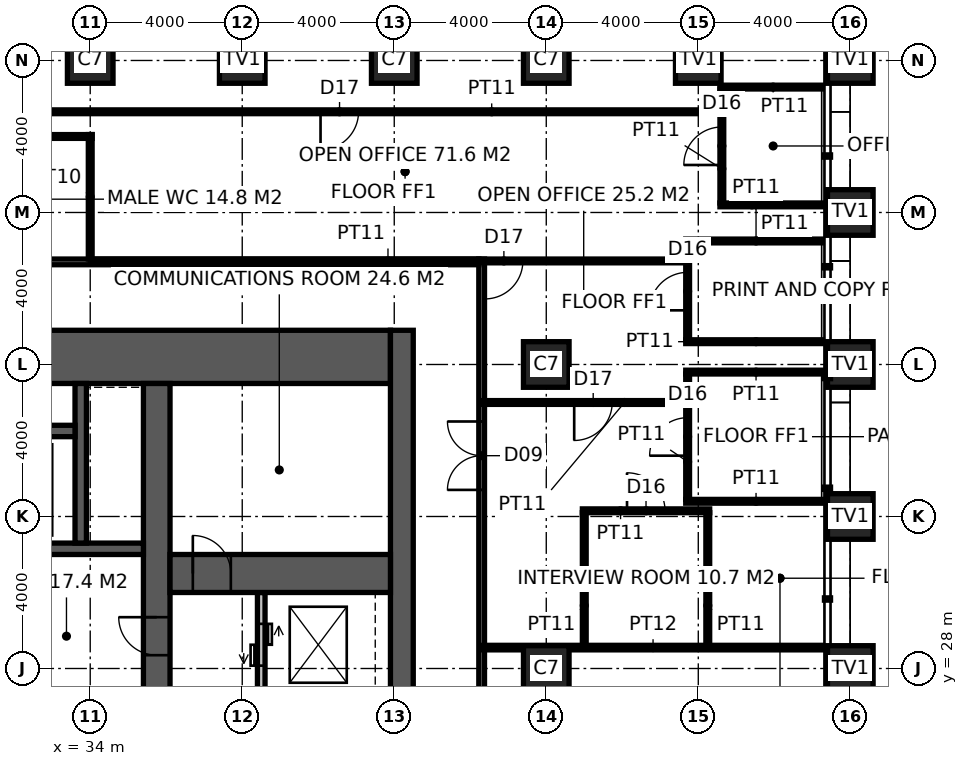
"""IFC4 building model, lengths in metres.
Left out: names, types, materials, properties, quantities, classifications, styles, units other than length and angle.
Written with IfcOpenShell. Run it as: python <this file> out.ifc"""

import sys

from ifc_helpers import new_model, si_unit, direction, frame, frame_2d, origin, origin_2d, place, context, subcontext, project, spatial, rectangle, hollow_rectangle, extrude, element, fill, save


model = new_model("IFC4")
c1 = context("Model", 3, precision=1e-05, world=origin(), true_north=direction((0.0, 1.0)))
c2 = subcontext(c1, "Body", "Model", "MODEL_VIEW")
j1 = project(units=[si_unit("LENGTHUNIT", "METRE"), si_unit("PLANEANGLEUNIT", "RADIAN")], contexts=[c1])
p1 = place(None, origin())
s1 = spatial("IfcSite", under=j1, at=p1, CompositionType="ELEMENT")
p2 = place(p1, origin())
s2 = spatial("IfcBuilding", under=s1, at=p2, CompositionType="ELEMENT")
p3 = place(p2, frame((0.0, 0.0, 43.0)))
s3 = spatial("IfcBuildingStorey", under=s2, at=p3, CompositionType="ELEMENT", Elevation=43.0)
for number, where, z_axis, x_axis in (
    (1, (54.0, 28.0, 0.0), (0.0, 0.0, 1.0), (1.0, 0.0, 0.0)),
    (2, (54.0, 32.0, 0.0), (0.0, 0.0, 1.0), (1.0, 0.0, 0.0)),
    (3, (54.0, 36.0, 0.0), (0.0, 0.0, 1.0), (1.0, 0.0, 0.0)),
    (4, (54.0, 40.0, 0.0), (0.0, 0.0, 1.0), (1.0, 0.0, 0.0)),
    (5, (54.0, 44.0, 0.0), (0.0, 0.0, 1.0), (1.0, 0.0, 0.0)),
    (6, (38.0, 44.0, 0.0), (0.0, 0.0, 1.0), (1.0, 0.0, 0.0)),
    (7, (50.0, 44.0, 0.0), (0.0, 0.0, 1.0), (1.0, 0.0, 0.0)),
):
    element("IfcColumn", number, at=place(p3, frame(where, z_axis=z_axis, x_axis=x_axis)), inside=s3, PredefinedType="USERDEFINED", context=c2, shape_type="SweptSolid", body=[
        extrude(hollow_rectangle(XDim=1.2, YDim=1.2, WallThickness=0.1, at=origin_2d()), origin(), (0.0, 0.0, 1.0), 4.0),
    ])
for number, where, z_axis, x_axis in (
    (8, (34.0, 44.0, 0.0), (0.0, 0.0, 1.0), (1.0, 0.0, 0.0)),
    (9, (42.0, 44.0, 0.0), (0.0, 0.0, 1.0), (1.0, 0.0, 0.0)),
    (10, (46.0, 28.0, 0.0), (0.0, 0.0, 1.0), (1.0, 0.0, 0.0)),
    (11, (46.0, 36.0, 0.0), (0.0, 0.0, 1.0), (1.0, 0.0, 0.0)),
    (12, (46.0, 44.0, 0.0), (0.0, 0.0, 1.0), (1.0, 0.0, 0.0)),
):
    element("IfcColumn", number, at=place(p3, frame(where, z_axis=z_axis, x_axis=x_axis)), inside=s3, PredefinedType="COLUMN", context=c2, shape_type="SweptSolid", body=[
        extrude(hollow_rectangle(XDim=1.2, YDim=1.2, WallThickness=0.1, at=origin_2d()), origin(), (0.0, 0.0, 1.0), 4.0),
    ])
p4 = place(p3, frame((18.5, 36.2, -0.15), z_axis=(0.0, 0.0, 1.0), x_axis=(1.0, 0.0, 0.0)))
e13 = element("IfcWall", 13, at=p4, inside=s3, PredefinedType="SHEAR", context=c2, shape_type="SweptSolid", body=[
    extrude(rectangle(XDim=23.4, YDim=1.4, at=frame_2d((11.7, 0.0))), origin(), (0.0, 0.0, 1.0), 4.0),
])
p5 = place(p3, frame((42.2, 17.1, -0.15), z_axis=(0.0, 0.0, 1.0), x_axis=(0.0, 1.0, 0.0)))
e14 = element("IfcWall", 14, at=p5, inside=s3, PredefinedType="SHEAR", context=c2, shape_type="SweptSolid", body=[
    extrude(rectangle(XDim=19.8, YDim=0.6, at=frame_2d((9.9, 0.0))), origin(), (0.0, 0.0, 1.0), 4.0),
])
p6 = place(p3, frame((35.75, 18.5, -0.15), z_axis=(0.0, 0.0, 1.0), x_axis=(0.0, 1.0, 0.0)))
e15 = element("IfcWall", 15, at=p6, inside=s3, PredefinedType="SHEAR", context=c2, shape_type="SweptSolid", body=[
    extrude(rectangle(XDim=17.0, YDim=0.7, at=frame_2d((8.5, 0.0))), origin(), (0.0, 0.0, 1.0), 4.0),
])
p7 = place(p6, frame((9.85, 0.0, 0.15)))
e16 = element("IfcOpeningElement", 16, at=p7, cuts=e15, PredefinedType="OPENING", context=c2, shape_type="SweptSolid", body=[
    extrude(rectangle(XDim=1.0, YDim=2.2, at=frame_2d((0.5, 1.1))), frame((0.0, 0.36, 0.0), z_axis=(0.0, -1.0, 0.0), x_axis=(1.0, 0.0, 0.0)), (0.0, 0.0, 1.0), 0.72),
])
p8 = place(p3, frame((24.15, 31.15, -0.15), z_axis=(0.0, 0.0, 1.0), x_axis=(1.0, 0.0, 0.0)))
e17 = element("IfcWall", 17, at=p8, inside=s3, PredefinedType="SHEAR", context=c2, shape_type="SweptSolid", body=[
    extrude(rectangle(XDim=11.25, YDim=0.3, at=frame_2d((5.625, 0.0))), origin(), (0.0, 0.0, 1.0), 4.0),
])
p9 = place(p8, frame((7.25, 0.0, 0.15)))
e18 = element("IfcOpeningElement", 18, at=p9, cuts=e17, PredefinedType="OPENING", context=c2, shape_type="SweptSolid", body=[
    extrude(rectangle(XDim=1.4, YDim=2.4, at=frame_2d((0.7, 1.2))), frame((0.0, 0.16, 0.0), z_axis=(0.0, -1.0, 0.0), x_axis=(1.0, 0.0, 0.0)), (0.0, 0.0, 1.0), 0.32),
])
p10 = place(p3, frame((33.75, 31.3, -0.15), z_axis=(0.0, 0.0, 1.0), x_axis=(0.0, 1.0, 0.0)))
e19 = element("IfcWall", 19, at=p10, inside=s3, PredefinedType="SHEAR", context=c2, shape_type="SweptSolid", body=[
    extrude(rectangle(XDim=4.2, YDim=0.3, at=frame_2d((2.1, 0.0))), origin(), (0.0, 0.0, 1.0), 4.0),
])
p11 = place(p3, frame((25.0, 34.25, -0.15), z_axis=(0.0, 0.0, 1.0), x_axis=(1.0, 0.0, 0.0)))
e20 = element("IfcWall", 20, at=p11, inside=s3, PredefinedType="SHEAR", context=c2, shape_type="SweptSolid", body=[
    extrude(rectangle(XDim=8.6, YDim=0.3, at=frame_2d((4.3, 0.0))), origin(), (0.0, 0.0, 1.0), 4.0),
])
p12 = place(p3, frame((38.5, 18.5, -0.15), z_axis=(0.0, 0.0, 1.0), x_axis=(0.0, 1.0, 0.0)))
e21 = element("IfcWall", 21, at=p12, inside=s3, PredefinedType="SOLIDWALL", context=c2, shape_type="SweptSolid", body=[
    extrude(rectangle(XDim=11.5, YDim=0.2, at=frame_2d((5.75, 0.0))), origin(), (0.0, 0.0, 1.0), 4.0),
])
p13 = place(p12, frame((0.875, 0.0, 0.15)))
e22 = element("IfcOpeningElement", 22, at=p13, cuts=e21, PredefinedType="OPENING", context=c2, shape_type="SweptSolid", body=[
    extrude(rectangle(XDim=1.1, YDim=2.2, at=frame_2d((0.55, 1.1))), frame((0.0, 0.11, 0.0), z_axis=(0.0, -1.0, 0.0), x_axis=(1.0, 0.0, 0.0)), (0.0, 0.0, 1.0), 0.22),
])
p14 = place(p12, frame((3.825, 0.0, 0.15)))
e23 = element("IfcOpeningElement", 23, at=p14, cuts=e21, PredefinedType="OPENING", context=c2, shape_type="SweptSolid", body=[
    extrude(rectangle(XDim=1.1, YDim=2.2, at=frame_2d((0.55, 1.1))), frame((0.0, 0.11, 0.0), z_axis=(0.0, -1.0, 0.0), x_axis=(1.0, 0.0, 0.0)), (0.0, 0.0, 1.0), 0.22),
])
p15 = place(p12, frame((6.675, 0.0, 0.15)))
e24 = element("IfcOpeningElement", 24, at=p15, cuts=e21, PredefinedType="OPENING", context=c2, shape_type="SweptSolid", body=[
    extrude(rectangle(XDim=1.1, YDim=2.2, at=frame_2d((0.55, 1.1))), frame((0.0, 0.11, 0.0), z_axis=(0.0, -1.0, 0.0), x_axis=(1.0, 0.0, 0.0)), (0.0, 0.0, 1.0), 0.22),
])
p16 = place(p12, frame((9.575, 0.0, 0.15)))
e25 = element("IfcOpeningElement", 25, at=p16, cuts=e21, PredefinedType="OPENING", context=c2, shape_type="SweptSolid", body=[
    extrude(rectangle(XDim=1.1, YDim=2.2, at=frame_2d((0.55, 1.1))), frame((0.0, 0.11, 0.0), z_axis=(0.0, -1.0, 0.0), x_axis=(1.0, 0.0, 0.0)), (0.0, 0.0, 1.0), 0.22),
])
p17 = place(p3, frame((36.1, 30.5, -0.15), z_axis=(0.0, 0.0, 1.0), x_axis=(1.0, 0.0, 0.0)))
e26 = element("IfcWall", 26, at=p17, inside=s3, PredefinedType="SHEAR", context=c2, shape_type="SweptSolid", body=[
    extrude(rectangle(XDim=5.8, YDim=1.0, at=frame_2d((2.9, 0.0))), origin(), (0.0, 0.0, 1.0), 4.0),
])
p18 = place(p17, frame((0.6, 0.0, 0.15)))
e27 = element("IfcOpeningElement", 27, at=p18, cuts=e26, PredefinedType="OPENING", context=c2, shape_type="SweptSolid", body=[
    extrude(rectangle(XDim=1.0, YDim=2.2, at=frame_2d((0.5, 1.1))), frame((0.0, 0.51, 0.0), z_axis=(0.0, -1.0, 0.0), x_axis=(1.0, 0.0, 0.0)), (0.0, 0.0, 1.0), 1.02),
])
p19 = place(p3, frame((44.3, 15.225, 0.0), z_axis=(0.0, 0.0, 1.0), x_axis=(0.0, 1.0, 0.0)))
e28 = element("IfcWall", 28, at=p19, inside=s3, PredefinedType="PARTITIONING", context=c2, shape_type="SweptSolid", body=[
    extrude(rectangle(XDim=23.55, YDim=0.15, at=frame_2d((11.775, 0.0))), origin(), (0.0, 0.0, 1.0), 3.85),
])
p20 = place(p19, frame((2.224, 0.0, 0.0)))
e29 = element("IfcOpeningElement", 29, at=p20, cuts=e28, PredefinedType="OPENING", context=c2, shape_type="SweptSolid", body=[
    extrude(rectangle(XDim=1.8, YDim=2.4, at=frame_2d((0.9, 1.2))), frame((0.0, 0.085, 0.0), z_axis=(0.0, -1.0, 0.0), x_axis=(1.0, 0.0, 0.0)), (0.0, 0.0, 1.0), 0.17),
])
p21 = place(p19, frame((17.475, 0.0, 0.0)))
e30 = element("IfcOpeningElement", 30, at=p21, cuts=e28, PredefinedType="OPENING", context=c2, shape_type="SweptSolid", body=[
    extrude(rectangle(XDim=1.8, YDim=2.4, at=frame_2d((0.9, 1.2))), frame((0.0, 0.085, 0.0), z_axis=(0.0, -1.0, 0.0), x_axis=(1.0, 0.0, 0.0)), (0.0, 0.0, 1.0), 0.17),
])
p22 = place(p19, frame((10.275, 0.0, 0.0)))
e31 = element("IfcOpeningElement", 31, at=p22, cuts=e28, PredefinedType="OPENING", context=c2, shape_type="SweptSolid", body=[
    extrude(rectangle(XDim=1.0, YDim=2.2, at=frame_2d((0.5, 1.1))), frame((0.0, 0.085, 0.0), z_axis=(0.0, -1.0, 0.0), x_axis=(1.0, 0.0, 0.0)), (0.0, 0.0, 1.0), 0.17),
])
p23 = place(p3, frame((15.775, 38.7, 0.0), z_axis=(0.0, 0.0, 1.0), x_axis=(1.0, 0.0, 0.0)))
e32 = element("IfcWall", 32, at=p23, inside=s3, PredefinedType="PARTITIONING", context=c2, shape_type="SweptSolid", body=[
    extrude(rectangle(XDim=28.45, YDim=0.15, at=frame_2d((14.225, 0.0))), origin(), (0.0, 0.0, 1.0), 3.85),
])
p24 = place(p23, frame((7.975, 0.0, 0.0)))
e33 = element("IfcOpeningElement", 33, at=p24, cuts=e32, PredefinedType="OPENING", context=c2, shape_type="SweptSolid", body=[
    extrude(rectangle(XDim=0.9, YDim=2.1, at=frame_2d((0.45, 1.05))), frame((0.0, 0.085, 0.0), z_axis=(0.0, -1.0, 0.0), x_axis=(1.0, 0.0, 0.0)), (0.0, 0.0, 1.0), 0.17),
])
p25 = place(p23, frame((11.725, 0.0, 0.0)))
e34 = element("IfcOpeningElement", 34, at=p25, cuts=e32, PredefinedType="OPENING", context=c2, shape_type="SweptSolid", body=[
    extrude(rectangle(XDim=1.0, YDim=2.1, at=frame_2d((0.5, 1.05))), frame((0.0, 0.085, 0.0), z_axis=(0.0, -1.0, 0.0), x_axis=(1.0, 0.0, 0.0)), (0.0, 0.0, 1.0), 0.17),
])
p26 = place(p23, frame((15.575, 0.0, 0.0)))
e35 = element("IfcOpeningElement", 35, at=p26, cuts=e32, PredefinedType="OPENING", context=c2, shape_type="SweptSolid", body=[
    extrude(rectangle(XDim=0.9, YDim=2.1, at=frame_2d((0.45, 1.05))), frame((0.0, 0.085, 0.0), z_axis=(0.0, -1.0, 0.0), x_axis=(1.0, 0.0, 0.0)), (0.0, 0.0, 1.0), 0.17),
])
p27 = place(p3, frame((34.0, 38.775, 0.0), z_axis=(0.0, 0.0, 1.0), x_axis=(0.0, 1.0, 0.0)))
e36 = element("IfcWall", 36, at=p27, inside=s3, PredefinedType="PARTITIONING", context=c2, shape_type="SweptSolid", body=[
    extrude(rectangle(XDim=3.275, YDim=0.1, at=frame_2d((1.638, 0.0))), origin(), (0.0, 0.0, 1.0), 2.85),
])
p28 = place(p3, frame((21.95, 42.0, 0.0), z_axis=(0.0, 0.0, 1.0), x_axis=(1.0, 0.0, 0.0)))
e37 = element("IfcWall", 37, at=p28, inside=s3, PredefinedType="PARTITIONING", context=c2, shape_type="SweptSolid", body=[
    extrude(rectangle(XDim=12.1, YDim=0.1, at=frame_2d((6.05, 0.0))), origin(), (0.0, 0.0, 1.0), 3.85),
])
p29 = place(p3, frame((44.3, 28.55, 0.0), z_axis=(0.0, 0.0, 1.0), x_axis=(1.0, 0.0, 0.0)))
e38 = element("IfcWall", 38, at=p29, inside=s3, PredefinedType="PARTITIONING", context=c2, shape_type="SweptSolid", body=[
    extrude(rectangle(XDim=9.02, YDim=0.12, at=frame_2d((4.51, 0.0))), origin(), (0.0, 0.0, 1.0), 2.65),
])
p30 = place(p3, frame((46.95, 32.15, 0.0), z_axis=(0.0, 0.0, 1.0), x_axis=(1.0, 0.0, 0.0)))
e39 = element("IfcWall", 39, at=p30, inside=s3, PredefinedType="PARTITIONING", context=c2, shape_type="SweptSolid", body=[
    extrude(rectangle(XDim=3.35, YDim=0.1, at=frame_2d((1.675, 0.0))), origin(), (0.0, 0.0, 1.0), 2.95),
])
p31 = place(p30, frame((1.175, 0.0, 0.0)))
e40 = element("IfcOpeningElement", 40, at=p31, cuts=e39, PredefinedType="OPENING", context=c2, shape_type="SweptSolid", body=[
    extrude(rectangle(XDim=1.0, YDim=2.2, at=frame_2d((0.5, 1.1))), frame((0.0, 0.06, 0.0), z_axis=(0.0, -1.0, 0.0), x_axis=(1.0, 0.0, 0.0)), (0.0, 0.0, 1.0), 0.12),
])
p32 = place(p3, frame((49.67, 32.4, 0.0), z_axis=(0.0, 0.0, 1.0), x_axis=(1.0, 0.0, 0.0)))
e41 = element("IfcWall", 41, at=p32, inside=s3, PredefinedType="PARTITIONING", context=c2, shape_type="SweptSolid", body=[
    extrude(rectangle(XDim=3.7, YDim=0.1, at=frame_2d((1.85, 0.0))), origin(), (0.0, 0.0, 1.0), 3.85),
])
p33 = place(p3, frame((49.67, 35.8, 0.0), z_axis=(0.0, 0.0, 1.0), x_axis=(1.0, 0.0, 0.0)))
e42 = element("IfcWall", 42, at=p33, inside=s3, PredefinedType="PARTITIONING", context=c2, shape_type="SweptSolid", body=[
    extrude(rectangle(XDim=3.7, YDim=0.1, at=frame_2d((1.85, 0.0))), origin(), (0.0, 0.0, 1.0), 2.85),
])
for number, where, z_axis, x_axis in (
    (43, (49.67, 36.6, 0.0), (0.0, 0.0, 1.0), (1.0, 0.0, 0.0)),
    (44, (49.67, 39.25, 0.0), (0.0, 0.0, 1.0), (1.0, 0.0, 0.0)),
):
    element("IfcWall", number, at=place(p3, frame(where, z_axis=z_axis, x_axis=x_axis)), inside=s3, PredefinedType="PARTITIONING", context=c2, shape_type="SweptSolid", body=[
        extrude(rectangle(XDim=3.7, YDim=0.1, at=frame_2d((1.85, 0.0))), origin(), (0.0, 0.0, 1.0), 3.85),
    ])
for number, where, z_axis, x_axis in (
    (45, (50.57, 40.2, 0.0), (0.0, 0.0, 1.0), (1.0, 0.0, 0.0)),
    (46, (50.57, 43.3, 0.0), (0.0, 0.0, 1.0), (1.0, 0.0, 0.0)),
):
    element("IfcWall", number, at=place(p3, frame(where, z_axis=z_axis, x_axis=x_axis)), inside=s3, PredefinedType="PARTITIONING", context=c2, shape_type="SweptSolid", body=[
        extrude(rectangle(XDim=2.8, YDim=0.1, at=frame_2d((1.4, 0.0))), origin(), (0.0, 0.0, 1.0), 3.85),
    ])
p34 = place(p3, frame((47.0, 28.61, 0.0), z_axis=(0.0, 0.0, 1.0), x_axis=(0.0, 1.0, 0.0)))
e47 = element("IfcWall", 47, at=p34, inside=s3, PredefinedType="PARTITIONING", context=c2, shape_type="SweptSolid", body=[
    extrude(rectangle(XDim=3.49, YDim=0.1, at=frame_2d((1.745, 0.0))), origin(), (0.0, 0.0, 1.0), 3.85),
])
p35 = place(p3, frame((49.72, 32.45, 0.0), z_axis=(0.0, 0.0, 1.0), x_axis=(0.0, 1.0, 0.0)))
e48 = element("IfcWall", 48, at=p35, inside=s3, PredefinedType="PARTITIONING", context=c2, shape_type="SweptSolid", body=[
    extrude(rectangle(XDim=3.3, YDim=0.1, at=frame_2d((1.65, 0.0))), origin(), (0.0, 0.0, 1.0), 3.85),
])
p36 = place(p35, frame((1.15, 0.0, 0.0)))
e49 = element("IfcOpeningElement", 49, at=p36, cuts=e48, PredefinedType="OPENING", context=c2, shape_type="SweptSolid", body=[
    extrude(rectangle(XDim=1.0, YDim=2.2, at=frame_2d((0.5, 1.1))), frame((0.0, 0.06, 0.0), z_axis=(0.0, -1.0, 0.0), x_axis=(1.0, 0.0, 0.0)), (0.0, 0.0, 1.0), 0.12),
])
p37 = place(p3, frame((49.72, 36.65, 0.0), z_axis=(0.0, 0.0, 1.0), x_axis=(0.0, 1.0, 0.0)))
e50 = element("IfcWall", 50, at=p37, inside=s3, PredefinedType="PARTITIONING", context=c2, shape_type="SweptSolid", body=[
    extrude(rectangle(XDim=2.55, YDim=0.1, at=frame_2d((1.275, 0.0))), origin(), (0.0, 0.0, 1.0), 2.65),
])
p38 = place(p37, frame((0.775, 0.0, 0.0)))
e51 = element("IfcOpeningElement", 51, at=p38, cuts=e50, PredefinedType="OPENING", context=c2, shape_type="SweptSolid", body=[
    extrude(rectangle(XDim=1.0, YDim=2.2, at=frame_2d((0.5, 1.1))), frame((0.0, 0.06, 0.0), z_axis=(0.0, -1.0, 0.0), x_axis=(1.0, 0.0, 0.0)), (0.0, 0.0, 1.0), 0.12),
])
p39 = place(p3, frame((50.25, 28.61, 0.0), z_axis=(0.0, 0.0, 1.0), x_axis=(0.0, 1.0, 0.0)))
e52 = element("IfcWall", 52, at=p39, inside=s3, PredefinedType="PARTITIONING", context=c2, shape_type="SweptSolid", body=[
    extrude(rectangle(XDim=3.49, YDim=0.1, at=frame_2d((1.745, 0.0))), origin(), (0.0, 0.0, 1.0), 3.85),
])
p40 = place(p3, frame((50.62, 40.25, 0.0), z_axis=(0.0, 0.0, 1.0), x_axis=(0.0, 1.0, 0.0)))
e53 = element("IfcWall", 53, at=p40, inside=s3, PredefinedType="PARTITIONING", context=c2, shape_type="SweptSolid", body=[
    extrude(rectangle(XDim=3.0, YDim=0.1, at=frame_2d((1.5, 0.0))), origin(), (0.0, 0.0, 1.0), 3.85),
])
p41 = place(p40, frame((1.0, 0.0, 0.0)))
e54 = element("IfcOpeningElement", 54, at=p41, cuts=e53, PredefinedType="OPENING", context=c2, shape_type="SweptSolid", body=[
    extrude(rectangle(XDim=1.0, YDim=2.2, at=frame_2d((0.5, 1.1))), frame((0.0, 0.06, 0.0), z_axis=(0.0, -1.0, 0.0), x_axis=(1.0, 0.0, 0.0)), (0.0, 0.0, 1.0), 0.12),
])
p42 = place(p3, frame((49.67, 35.0, 0.0), z_axis=(0.0, 0.0, 1.0), x_axis=(-1.0, 0.0, 0.0)))
e55 = element("IfcWall", 55, at=p42, inside=s3, PredefinedType="PARTITIONING", context=c2, shape_type="SweptSolid", body=[
    extrude(rectangle(XDim=5.37, YDim=0.1, at=frame_2d((2.685, 0.0))), origin(), (0.0, 0.0, 1.0), 3.85),
])
p43 = place(p42, frame((1.935, 0.0, 0.0)))
e56 = element("IfcOpeningElement", 56, at=p43, cuts=e55, PredefinedType="OPENING", context=c2, shape_type="SweptSolid", body=[
    extrude(rectangle(XDim=1.0, YDim=2.2, at=frame_2d((0.5, 1.1))), frame((0.0, 0.06, 0.0), z_axis=(0.0, -1.0, 0.0), x_axis=(1.0, 0.0, 0.0)), (0.0, 0.0, 1.0), 0.12),
])
p44 = place(p3, frame((49.67, 38.725, 0.0), z_axis=(0.0, 0.0, 1.0), x_axis=(-1.0, 0.0, 0.0)))
e57 = element("IfcWall", 57, at=p44, inside=s3, PredefinedType="PARTITIONING", context=c2, shape_type="SweptSolid", body=[
    extrude(rectangle(XDim=15.67, YDim=0.1, at=frame_2d((7.835, 0.0))), origin(), (0.0, 0.0, 1.0), 3.85),
])
p45 = place(p44, frame((4.285, 0.0, 0.0)))
e58 = element("IfcOpeningElement", 58, at=p45, cuts=e57, PredefinedType="OPENING", context=c2, shape_type="SweptSolid", body=[
    extrude(rectangle(XDim=1.0, YDim=2.2, at=frame_2d((0.5, 1.1))), frame((0.0, 0.06, 0.0), z_axis=(0.0, -1.0, 0.0), x_axis=(1.0, 0.0, 0.0)), (0.0, 0.0, 1.0), 0.12),
])
p46 = place(p3, frame((50.57, 42.65, 0.0), z_axis=(0.0, 0.0, 1.0), x_axis=(-1.0, 0.0, 0.0)))
e59 = element("IfcWall", 59, at=p46, inside=s3, PredefinedType="PARTITIONING", context=c2, shape_type="SweptSolid", body=[
    extrude(rectangle(XDim=20.019, YDim=0.1, at=frame_2d((10.01, 0.0))), origin(), (0.0, 0.0, 1.0), 3.85),
])
p47 = place(p46, frame((9.51, 0.0, 0.0)))
e60 = element("IfcOpeningElement", 60, at=p47, cuts=e59, PredefinedType="OPENING", context=c2, shape_type="SweptSolid", body=[
    extrude(rectangle(XDim=1.0, YDim=2.2, at=frame_2d((0.5, 1.1))), frame((0.0, 0.06, 0.0), z_axis=(0.0, -1.0, 0.0), x_axis=(1.0, 0.0, 0.0)), (0.0, 0.0, 1.0), 0.12),
])
p48 = place(p7, origin())
e61 = element("IfcDoor", 61, at=p48, inside=s3, OperationType="SINGLE_SWING_RIGHT", PredefinedType="DOOR", context=c2, shape_type="SweptSolid", body=[
    extrude(rectangle(XDim=1.0, YDim=2.2, at=frame_2d((0.5, 1.1))), frame((0.0, 0.025, 0.0), z_axis=(0.0, -1.0, 0.0), x_axis=(1.0, 0.0, 0.0)), (0.0, 0.0, 1.0), 0.05),
])
fill(e16, e61)
p49 = place(p18, origin())
e62 = element("IfcDoor", 62, at=p49, inside=s3, OperationType="SINGLE_SWING_LEFT", PredefinedType="DOOR", context=c2, shape_type="SweptSolid", body=[
    extrude(rectangle(XDim=1.0, YDim=2.2, at=frame_2d((0.5, 1.1))), frame((0.0, 0.025, 0.0), z_axis=(0.0, -1.0, 0.0), x_axis=(1.0, 0.0, 0.0)), (0.0, 0.0, 1.0), 0.05),
])
fill(e27, e62)
p50 = place(p21, origin())
e63 = element("IfcDoor", 63, at=p50, inside=s3, OperationType="DOUBLE_DOOR_DOUBLE_SWING", PredefinedType="DOOR", context=c2, shape_type="SweptSolid", body=[
    extrude(rectangle(XDim=1.8, YDim=2.4, at=frame_2d((0.9, 1.2))), frame((0.0, 0.025, 0.0), z_axis=(0.0, -1.0, 0.0), x_axis=(1.0, 0.0, 0.0)), (0.0, 0.0, 1.0), 0.05),
])
fill(e30, e63)
p51 = place(p31, origin())
e64 = element("IfcDoor", 64, at=p51, inside=s3, OperationType="SINGLE_SWING_LEFT", PredefinedType="DOOR", context=c2, shape_type="SweptSolid", body=[
    extrude(rectangle(XDim=1.0, YDim=2.2, at=frame_2d((0.5, 1.1))), frame((0.0, 0.025, 0.0), z_axis=(0.0, -1.0, 0.0), x_axis=(1.0, 0.0, 0.0)), (0.0, 0.0, 1.0), 0.05),
])
fill(e40, e64)
p52 = place(p36, origin())
e65 = element("IfcDoor", 65, at=p52, inside=s3, OperationType="SINGLE_SWING_LEFT", PredefinedType="DOOR", context=c2, shape_type="SweptSolid", body=[
    extrude(rectangle(XDim=1.0, YDim=2.2, at=frame_2d((0.5, 1.1))), frame((0.0, 0.025, 0.0), z_axis=(0.0, -1.0, 0.0), x_axis=(1.0, 0.0, 0.0)), (0.0, 0.0, 1.0), 0.05),
])
fill(e49, e65)
p53 = place(p38, origin())
e66 = element("IfcDoor", 66, at=p53, inside=s3, OperationType="SINGLE_SWING_LEFT", PredefinedType="DOOR", context=c2, shape_type="SweptSolid", body=[
    extrude(rectangle(XDim=1.0, YDim=2.2, at=frame_2d((0.5, 1.1))), frame((0.0, 0.025, 0.0), z_axis=(0.0, -1.0, 0.0), x_axis=(1.0, 0.0, 0.0)), (0.0, 0.0, 1.0), 0.05),
])
fill(e51, e66)
p54 = place(p41, origin())
e67 = element("IfcDoor", 67, at=p54, inside=s3, OperationType="SINGLE_SWING_LEFT", PredefinedType="DOOR", context=c2, shape_type="SweptSolid", body=[
    extrude(rectangle(XDim=1.0, YDim=2.2, at=frame_2d((0.5, 1.1))), frame((0.0, 0.025, 0.0), z_axis=(0.0, -1.0, 0.0), x_axis=(1.0, 0.0, 0.0)), (0.0, 0.0, 1.0), 0.05),
])
fill(e54, e67)
p55 = place(p43, origin())
e68 = element("IfcDoor", 68, at=p55, inside=s3, OperationType="SINGLE_SWING_RIGHT", PredefinedType="DOOR", context=c2, shape_type="SweptSolid", body=[
    extrude(rectangle(XDim=1.0, YDim=2.2, at=frame_2d((0.5, 1.1))), frame((0.0, 0.025, 0.0), z_axis=(0.0, -1.0, 0.0), x_axis=(1.0, 0.0, 0.0)), (0.0, 0.0, 1.0), 0.05),
])
fill(e56, e68)
p56 = place(p45, origin())
e69 = element("IfcDoor", 69, at=p56, inside=s3, OperationType="SINGLE_SWING_RIGHT", PredefinedType="DOOR", context=c2, shape_type="SweptSolid", body=[
    extrude(rectangle(XDim=1.0, YDim=2.2, at=frame_2d((0.5, 1.1))), frame((0.0, 0.025, 0.0), z_axis=(0.0, -1.0, 0.0), x_axis=(1.0, 0.0, 0.0)), (0.0, 0.0, 1.0), 0.05),
])
fill(e58, e69)
p57 = place(p47, origin())
e70 = element("IfcDoor", 70, at=p57, inside=s3, OperationType="SINGLE_SWING_RIGHT", PredefinedType="DOOR", context=c2, shape_type="SweptSolid", body=[
    extrude(rectangle(XDim=1.0, YDim=2.2, at=frame_2d((0.5, 1.1))), frame((0.0, 0.025, 0.0), z_axis=(0.0, -1.0, 0.0), x_axis=(1.0, 0.0, 0.0)), (0.0, 0.0, 1.0), 0.05),
])
fill(e60, e70)
p58 = place(p16, origin())
e71 = element("IfcDoor", 71, at=p58, inside=s3, OperationType="DOUBLE_DOOR_SLIDING", PredefinedType="DOOR", context=c2, shape_type="SweptSolid", body=[
    extrude(rectangle(XDim=1.1, YDim=2.2, at=frame_2d((0.55, 1.1))), frame((0.0, 0.025, 0.0), z_axis=(0.0, -1.0, 0.0), x_axis=(1.0, 0.0, 0.0)), (0.0, 0.0, 1.0), 0.05),
])
fill(e25, e71)
save(model, sys.argv[1])
